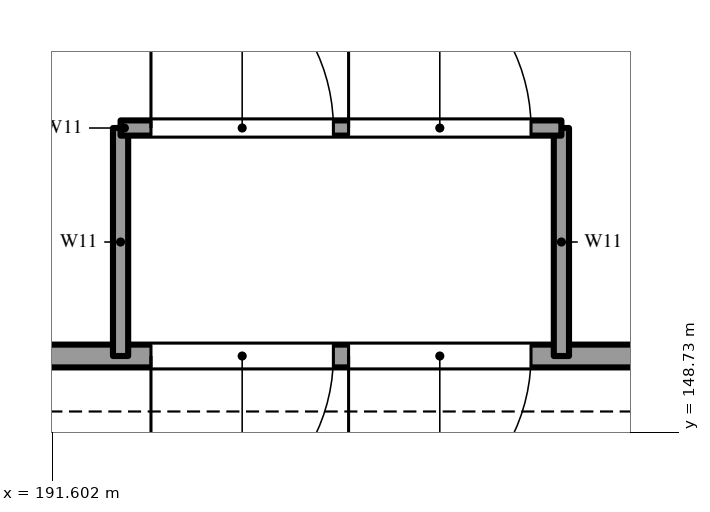
"""IFC4 building model, lengths in metres.
Left out: names, types, materials, properties, quantities, classifications, styles, units other than length and angle.
Written with IfcOpenShell. Run it as: python <this file> out.ifc"""

import sys

from ifc_helpers import new_model, si_unit, direction, frame, frame_2d, origin, place, context, subcontext, project, spatial, rectangle, extrude, element, fill, save


model = new_model("IFC4")
c1 = context("Model", 3, precision=1e-05, world=origin(), true_north=direction((0.0, 1.0)))
c2 = subcontext(c1, "Body", "Model", "MODEL_VIEW")
j1 = project(units=[si_unit("LENGTHUNIT", "METRE"), si_unit("PLANEANGLEUNIT", "RADIAN")], contexts=[c1])
p1 = place(None, origin())
s1 = spatial("IfcSite", under=j1, at=p1, CompositionType="ELEMENT")
p2 = place(p1, origin())
s2 = spatial("IfcBuilding", under=s1, at=p2, CompositionType="ELEMENT")
p3 = place(p2, origin())
s3 = spatial("IfcBuildingStorey", under=s2, at=p3, CompositionType="ELEMENT", Elevation=0.0)
p4 = place(p3, frame((190.0, 149.73, -0.3), z_axis=(0.0, 0.0, 1.0), x_axis=(1.0, 0.0, 0.0)))
e1 = element("IfcWall", 1, at=p4, inside=s3, PredefinedType="SOLIDWALL", context=c2, shape_type="SweptSolid", body=[
    extrude(rectangle(XDim=28.0, YDim=0.3, at=frame_2d((14.0, 0.0))), origin(), (0.0, 0.0, 1.0), 7.5),
])
p5 = place(p4, frame((2.9, 0.0, 0.3)))
e2 = element("IfcOpeningElement", 2, at=p5, cuts=e1, PredefinedType="OPENING", context=c2, shape_type="SweptSolid", body=[
    extrude(rectangle(XDim=2.4, YDim=2.4, at=frame_2d((1.2, 1.2))), frame((0.0, 0.16, 0.0), z_axis=(0.0, -1.0, 0.0), x_axis=(1.0, 0.0, 0.0)), (0.0, 0.0, 1.0), 0.32),
])
p6 = place(p4, frame((5.5, 0.0, 0.3)))
e3 = element("IfcOpeningElement", 3, at=p6, cuts=e1, PredefinedType="OPENING", context=c2, shape_type="SweptSolid", body=[
    extrude(rectangle(XDim=2.4, YDim=2.4, at=frame_2d((1.2, 1.2))), frame((0.0, 0.16, 0.0), z_axis=(0.0, -1.0, 0.0), x_axis=(1.0, 0.0, 0.0)), (0.0, 0.0, 1.0), 0.32),
])
p7 = place(p4, frame((11.9, 0.0, 0.3)))
e4 = element("IfcOpeningElement", 4, at=p7, cuts=e1, PredefinedType="OPENING", context=c2, shape_type="SweptSolid", body=[
    extrude(rectangle(XDim=2.4, YDim=2.4, at=frame_2d((1.2, 1.2))), frame((0.0, 0.16, 0.0), z_axis=(0.0, -1.0, 0.0), x_axis=(1.0, 0.0, 0.0)), (0.0, 0.0, 1.0), 0.32),
])
p8 = place(p4, frame((14.5, 0.0, 0.3)))
e5 = element("IfcOpeningElement", 5, at=p8, cuts=e1, PredefinedType="OPENING", context=c2, shape_type="SweptSolid", body=[
    extrude(rectangle(XDim=2.4, YDim=2.4, at=frame_2d((1.2, 1.2))), frame((0.0, 0.16, 0.0), z_axis=(0.0, -1.0, 0.0), x_axis=(1.0, 0.0, 0.0)), (0.0, 0.0, 1.0), 0.32),
])
p9 = place(p4, frame((20.4, 0.0, 0.3)))
e6 = element("IfcOpeningElement", 6, at=p9, cuts=e1, PredefinedType="OPENING", context=c2, shape_type="SweptSolid", body=[
    extrude(rectangle(XDim=2.4, YDim=2.4, at=frame_2d((1.2, 1.2))), frame((0.0, 0.16, 0.0), z_axis=(0.0, -1.0, 0.0), x_axis=(1.0, 0.0, 0.0)), (0.0, 0.0, 1.0), 0.32),
])
p10 = place(p4, frame((23.0, 0.0, 0.3)))
e7 = element("IfcOpeningElement", 7, at=p10, cuts=e1, PredefinedType="OPENING", context=c2, shape_type="SweptSolid", body=[
    extrude(rectangle(XDim=2.4, YDim=2.4, at=frame_2d((1.2, 1.2))), frame((0.0, 0.16, 0.0), z_axis=(0.0, -1.0, 0.0), x_axis=(1.0, 0.0, 0.0)), (0.0, 0.0, 1.0), 0.32),
])
for number, where, z_axis, x_axis in (
    (8, (192.5, 149.73, 0.0), (0.0, 0.0, 1.0), (0.0, 1.0, 0.0)),
    (9, (198.3, 149.73, 0.0), (0.0, 0.0, 1.0), (0.0, 1.0, 0.0)),
):
    element("IfcWall", number, at=place(p3, frame(where, z_axis=z_axis, x_axis=x_axis)), inside=s3, PredefinedType="SOLIDWALL", context=c2, shape_type="SweptSolid", body=[
        extrude(rectangle(XDim=3.0, YDim=0.2, at=frame_2d((1.5, 0.0))), origin(), (0.0, 0.0, 1.0), 3.2),
    ])
p11 = place(p3, frame((192.5, 152.73, 0.0), z_axis=(0.0, 0.0, 1.0), x_axis=(1.0, 0.0, 0.0)))
e10 = element("IfcWall", 10, at=p11, inside=s3, PredefinedType="SOLIDWALL", context=c2, shape_type="SweptSolid", body=[
    extrude(rectangle(XDim=5.8, YDim=0.2, at=frame_2d((2.9, 0.0))), origin(), (0.0, 0.0, 1.0), 3.2),
])
p12 = place(p11, frame((0.4, 0.0, 0.0)))
e11 = element("IfcOpeningElement", 11, at=p12, cuts=e10, PredefinedType="OPENING", context=c2, shape_type="SweptSolid", body=[
    extrude(rectangle(XDim=2.4, YDim=2.4, at=frame_2d((1.2, 1.2))), frame((0.0, 0.11, 0.0), z_axis=(0.0, -1.0, 0.0), x_axis=(1.0, 0.0, 0.0)), (0.0, 0.0, 1.0), 0.22),
])
p13 = place(p11, frame((3.0, 0.0, 0.0)))
e12 = element("IfcOpeningElement", 12, at=p13, cuts=e10, PredefinedType="OPENING", context=c2, shape_type="SweptSolid", body=[
    extrude(rectangle(XDim=2.4, YDim=2.4, at=frame_2d((1.2, 1.2))), frame((0.0, 0.11, 0.0), z_axis=(0.0, -1.0, 0.0), x_axis=(1.0, 0.0, 0.0)), (0.0, 0.0, 1.0), 0.22),
])
p14 = place(p5, frame((2.4, 0.0, 0.0), z_axis=(0.0, 0.0, 1.0), x_axis=(-1.0, 0.0, 0.0)))
e13 = element("IfcDoor", 13, at=p14, inside=s3, OperationType="DOUBLE_DOOR_SINGLE_SWING", PredefinedType="DOOR", context=c2, shape_type="SweptSolid", body=[
    extrude(rectangle(XDim=2.4, YDim=2.4, at=frame_2d((1.2, 1.2))), frame((0.0, 0.025, 0.0), z_axis=(0.0, -1.0, 0.0), x_axis=(1.0, 0.0, 0.0)), (0.0, 0.0, 1.0), 0.05),
])
fill(e2, e13)
p15 = place(p12, origin())
e14 = element("IfcDoor", 14, at=p15, inside=s3, OperationType="DOUBLE_DOOR_SINGLE_SWING", PredefinedType="DOOR", context=c2, shape_type="SweptSolid", body=[
    extrude(rectangle(XDim=2.4, YDim=2.4, at=frame_2d((1.2, 1.2))), frame((0.0, 0.025, 0.0), z_axis=(0.0, -1.0, 0.0), x_axis=(1.0, 0.0, 0.0)), (0.0, 0.0, 1.0), 0.05),
])
fill(e11, e14)
p16 = place(p6, frame((2.4, 0.0, 0.0), z_axis=(0.0, 0.0, 1.0), x_axis=(-1.0, 0.0, 0.0)))
e15 = element("IfcDoor", 15, at=p16, inside=s3, OperationType="DOUBLE_DOOR_SINGLE_SWING", PredefinedType="DOOR", context=c2, shape_type="SweptSolid", body=[
    extrude(rectangle(XDim=2.4, YDim=2.4, at=frame_2d((1.2, 1.2))), frame((0.0, 0.025, 0.0), z_axis=(0.0, -1.0, 0.0), x_axis=(1.0, 0.0, 0.0)), (0.0, 0.0, 1.0), 0.05),
])
fill(e3, e15)
p17 = place(p13, origin())
e16 = element("IfcDoor", 16, at=p17, inside=s3, OperationType="DOUBLE_DOOR_SINGLE_SWING", PredefinedType="DOOR", context=c2, shape_type="SweptSolid", body=[
    extrude(rectangle(XDim=2.4, YDim=2.4, at=frame_2d((1.2, 1.2))), frame((0.0, 0.025, 0.0), z_axis=(0.0, -1.0, 0.0), x_axis=(1.0, 0.0, 0.0)), (0.0, 0.0, 1.0), 0.05),
])
fill(e12, e16)
save(model, sys.argv[1])
